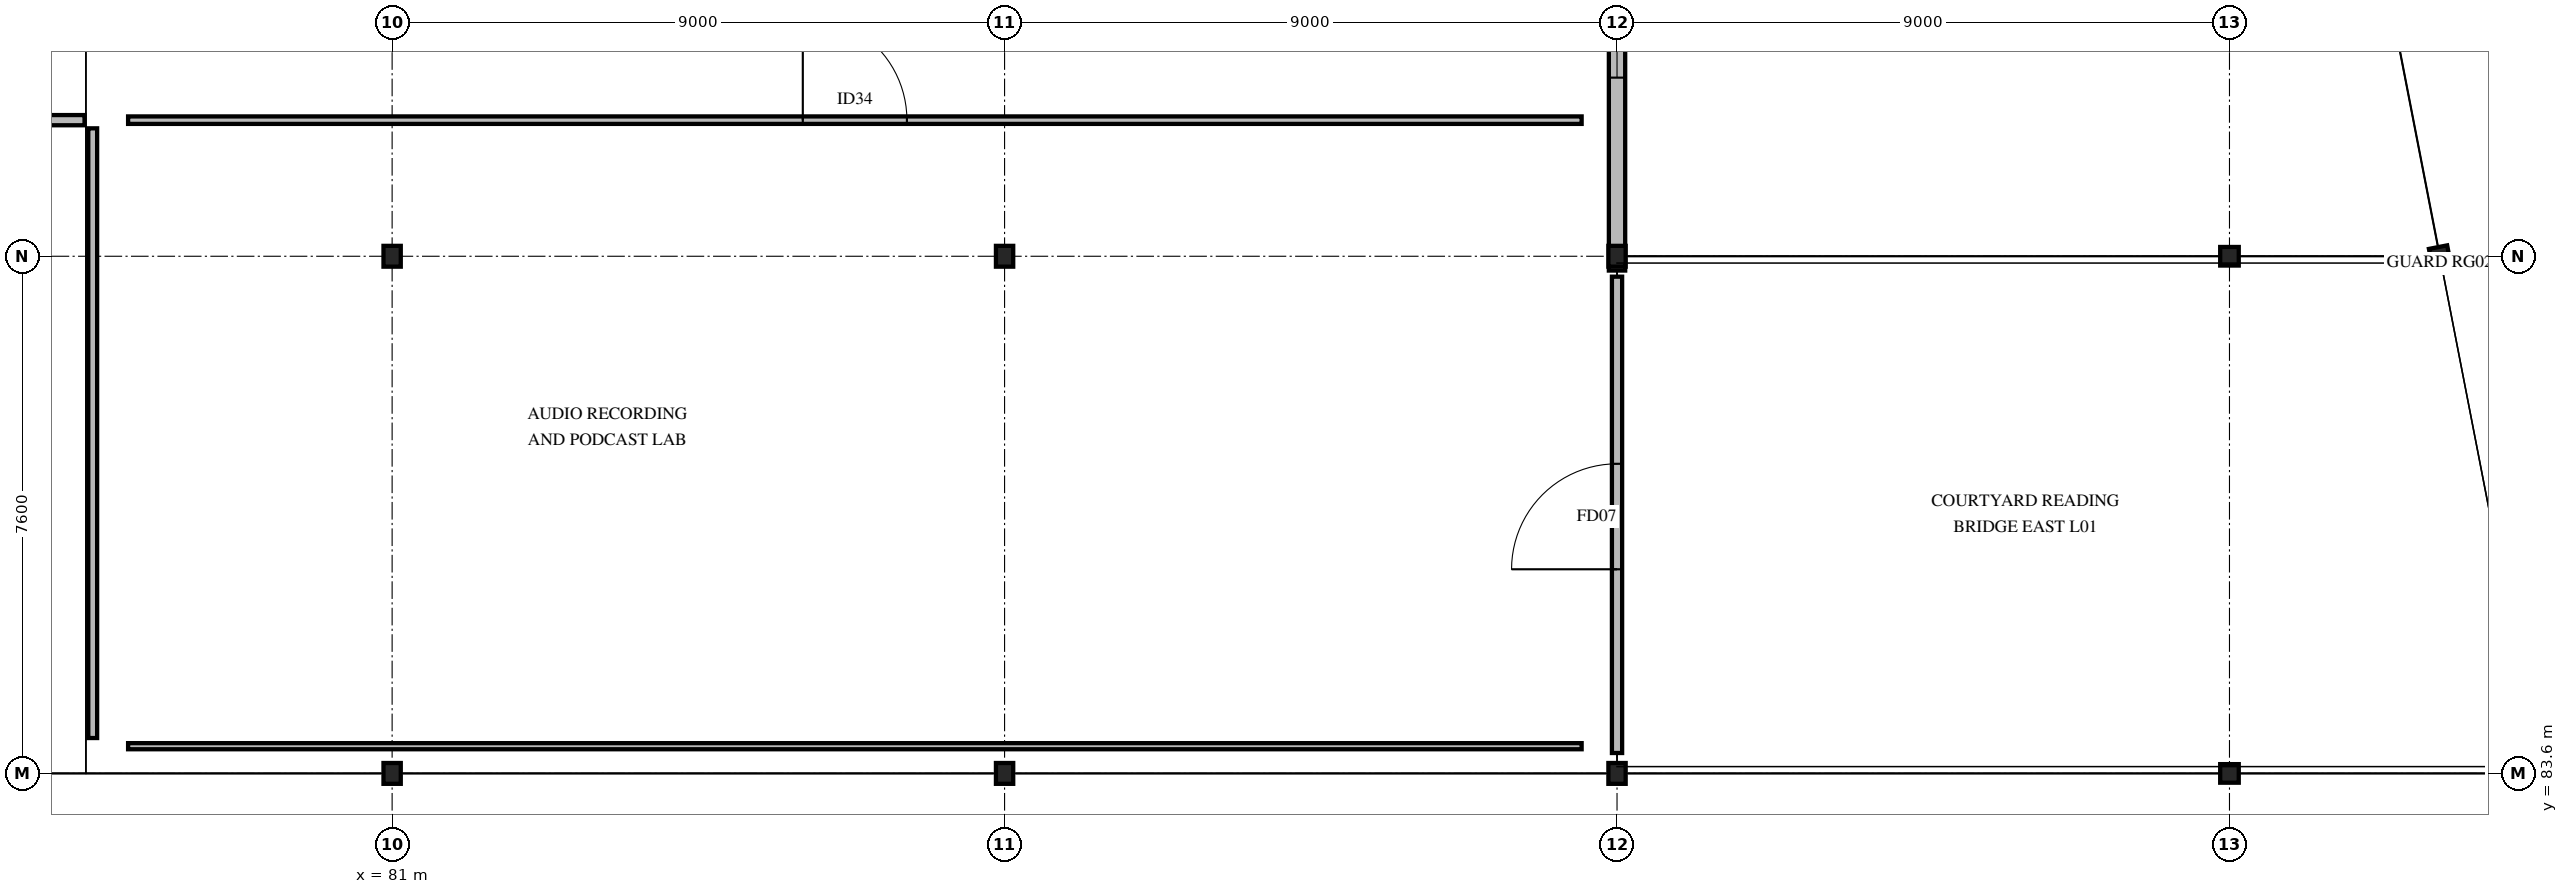
"""IFC4 building model, lengths in metres.
Left out: names, types, materials, properties, quantities, classifications, styles, units other than length and angle.
Written with IfcOpenShell. Run it as: python <this file> out.ifc"""

import sys

from ifc_helpers import new_model, si_unit, direction, frame, frame_2d, origin, origin_2d, place, context, subcontext, project, spatial, rectangle, hollow_circle, i_section, extrude, element, fill, save


model = new_model("IFC4")
c1 = context("Model", 3, precision=1e-05, world=origin(), true_north=direction((0.0, 1.0)))
c2 = subcontext(c1, "Body", "Model", "MODEL_VIEW")
j1 = project(units=[si_unit("LENGTHUNIT", "METRE"), si_unit("PLANEANGLEUNIT", "RADIAN")], contexts=[c1])
p1 = place(None, origin())
s1 = spatial("IfcSite", under=j1, at=p1, CompositionType="ELEMENT")
p2 = place(p1, origin())
s2 = spatial("IfcBuilding", under=s1, at=p2, CompositionType="ELEMENT")
p3 = place(p2, frame((0.0, 0.0, 5.04)))
s3 = spatial("IfcBuildingStorey", under=s2, at=p3, CompositionType="ELEMENT", Elevation=5.04)
for number, where, z_axis, x_axis in (
    (1, (81.0, 83.6, 0.0), (0.0, 0.0, 1.0), (1.0, 0.0, 0.0)),
    (2, (81.0, 91.2, 0.0), (0.0, 0.0, 1.0), (1.0, 0.0, 0.0)),
    (3, (90.0, 83.6, 0.0), (0.0, 0.0, 1.0), (1.0, 0.0, 0.0)),
    (4, (90.0, 91.2, 0.0), (0.0, 0.0, 1.0), (1.0, 0.0, 0.0)),
    (5, (99.0, 83.6, 0.0), (0.0, 0.0, 1.0), (1.0, 0.0, 0.0)),
    (6, (99.0, 91.2, 0.0), (0.0, 0.0, 1.0), (1.0, 0.0, 0.0)),
):
    element("IfcColumn", number, at=place(p3, frame(where, z_axis=z_axis, x_axis=x_axis)), inside=s3, PredefinedType="COLUMN", context=c2, shape_type="SweptSolid", body=[
        extrude(i_section(OverallWidth=0.254, OverallDepth=0.306, WebThickness=0.009, FlangeThickness=0.015, FilletRadius=0.015, at=origin_2d()), origin(), (0.0, 0.0, 1.0), 4.32),
    ])
for number, where, z_axis, x_axis in (
    (7, (108.0, 83.6, 0.0), (0.0, 0.0, 1.0), (1.0, 0.0, 0.0)),
    (8, (108.0, 91.2, 0.0), (0.0, 0.0, 1.0), (1.0, 0.0, 0.0)),
    (9, (111.091, 91.2, 0.0), (0.0, 0.0, 1.0), (0.982, 0.191, 0.0)),
):
    element("IfcColumn", number, at=place(p3, frame(where, z_axis=z_axis, x_axis=x_axis)), inside=s3, PredefinedType="COLUMN", context=c2, shape_type="SweptSolid", body=[
        extrude(hollow_circle(Radius=0.136, WallThickness=0.012, at=origin_2d()), origin(), (0.0, 0.0, 1.0), 4.32),
    ])
p4 = place(p3, frame((99.0, 90.99, 0.0), z_axis=(0.0, 0.0, 1.0), x_axis=(0.0, 1.0, 0.0)))
e10 = element("IfcWall", 10, at=p4, inside=s3, PredefinedType="STANDARD", context=c2, shape_type="SweptSolid", body=[
    extrude(rectangle(XDim=7.81, YDim=0.24, at=frame_2d((3.905, 0.0))), origin(), (0.0, 0.0, 1.0), 3.701),
])
p5 = place(p4, frame((2.835, 0.0, 0.85)))
e11 = element("IfcOpeningElement", 11, at=p5, cuts=e10, PredefinedType="OPENING", context=c2, shape_type="SweptSolid", body=[
    extrude(rectangle(XDim=2.35, YDim=1.5, at=frame_2d((1.175, 0.75))), frame((0.0, 0.13, 0.0), z_axis=(0.0, -1.0, 0.0), x_axis=(1.0, 0.0, 0.0)), (0.0, 0.0, 1.0), 0.26),
])
p6 = place(p3, frame((99.0, 83.9, 0.0), z_axis=(0.0, 0.0, 1.0), x_axis=(0.0, 1.0, 0.0)))
e12 = element("IfcWall", 12, at=p6, inside=s3, PredefinedType="PARTITIONING", context=c2, shape_type="SweptSolid", body=[
    extrude(rectangle(XDim=7.0, YDim=0.15, at=frame_2d((3.5, 0.0))), origin(), (0.0, 0.0, 1.0), 3.701),
])
p7 = place(p6, frame((2.7, 0.0, 0.0)))
e13 = element("IfcOpeningElement", 13, at=p7, cuts=e12, PredefinedType="OPENING", context=c2, shape_type="SweptSolid", body=[
    extrude(rectangle(XDim=1.55, YDim=2.2, at=frame_2d((0.775, 1.1))), frame((0.0, 0.085, 0.0), z_axis=(0.0, -1.0, 0.0), x_axis=(1.0, 0.0, 0.0)), (0.0, 0.0, 1.0), 0.17),
])
p8 = place(p3, frame((54.52, 93.2, 0.0), z_axis=(0.0, 0.0, 1.0), x_axis=(1.0, 0.0, 0.0)))
e14 = element("IfcWall", 14, at=p8, inside=s3, PredefinedType="PARTITIONING", context=c2, shape_type="SweptSolid", body=[
    extrude(rectangle(XDim=21.96, YDim=0.15, at=frame_2d((10.98, 0.0))), origin(), (0.0, 0.0, 1.0), 4.04),
])
p9 = place(p8, frame((9.99, 0.0, 0.0)))
e15 = element("IfcOpeningElement", 15, at=p9, cuts=e14, PredefinedType="OPENING", context=c2, shape_type="SweptSolid", body=[
    extrude(rectangle(XDim=1.0, YDim=2.15, at=frame_2d((0.5, 1.075))), frame((0.0, 0.085, 0.0), z_axis=(0.0, -1.0, 0.0), x_axis=(1.0, 0.0, 0.0)), (0.0, 0.0, 1.0), 0.17),
])
p10 = place(p3, frame((76.6, 84.12, 0.0), z_axis=(0.0, 0.0, 1.0), x_axis=(0.0, 1.0, 0.0)))
e16 = element("IfcWall", 16, at=p10, inside=s3, PredefinedType="PARTITIONING", context=c2, shape_type="SweptSolid", body=[
    extrude(rectangle(XDim=8.96, YDim=0.13, at=frame_2d((4.48, 0.0))), origin(), (0.0, 0.0, 1.0), 4.04),
])
p11 = place(p3, frame((77.12, 93.2, 0.0), z_axis=(0.0, 0.0, 1.0), x_axis=(1.0, 0.0, 0.0)))
e17 = element("IfcWall", 17, at=p11, inside=s3, PredefinedType="PARTITIONING", context=c2, shape_type="SweptSolid", body=[
    extrude(rectangle(XDim=21.36, YDim=0.11, at=frame_2d((10.68, 0.0))), origin(), (0.0, 0.0, 1.0), 4.04),
])
p12 = place(p11, frame((9.915, 0.0, 0.0)))
e18 = element("IfcOpeningElement", 18, at=p12, cuts=e17, PredefinedType="OPENING", context=c2, shape_type="SweptSolid", body=[
    extrude(rectangle(XDim=1.53, YDim=2.15, at=frame_2d((0.765, 1.075))), frame((0.0, 0.065, 0.0), z_axis=(0.0, -1.0, 0.0), x_axis=(1.0, 0.0, 0.0)), (0.0, 0.0, 1.0), 0.13),
])
p13 = place(p3, frame((77.12, 84.0, 0.0), z_axis=(0.0, 0.0, 1.0), x_axis=(1.0, 0.0, 0.0)))
e19 = element("IfcWall", 19, at=p13, inside=s3, PredefinedType="PARTITIONING", context=c2, shape_type="SweptSolid", body=[
    extrude(rectangle(XDim=21.36, YDim=0.09, at=frame_2d((10.68, 0.0))), origin(), (0.0, 0.0, 1.0), 4.04),
])
p14 = place(p5, origin())
e20 = element("IfcWindow", 20, at=p14, inside=s3, PartitioningType="SINGLE_PANEL", PredefinedType="WINDOW", context=c2, shape_type="SweptSolid", body=[
    extrude(rectangle(XDim=2.35, YDim=1.5, at=frame_2d((1.175, 0.75))), frame((0.0, 0.03, 0.0), z_axis=(0.0, -1.0, 0.0), x_axis=(1.0, 0.0, 0.0)), (0.0, 0.0, 1.0), 0.06),
])
fill(e11, e20)
p15 = place(p7, origin())
e21 = element("IfcDoor", 21, at=p15, inside=s3, OperationType="SINGLE_SWING_LEFT", PredefinedType="DOOR", context=c2, shape_type="SweptSolid", body=[
    extrude(rectangle(XDim=1.55, YDim=2.2, at=frame_2d((0.775, 1.1))), frame((0.0, 0.025, 0.0), z_axis=(0.0, -1.0, 0.0), x_axis=(1.0, 0.0, 0.0)), (0.0, 0.0, 1.0), 0.05),
])
fill(e13, e21)
p16 = place(p12, origin())
e22 = element("IfcDoor", 22, at=p16, inside=s3, OperationType="SINGLE_SWING_LEFT", PredefinedType="DOOR", context=c2, shape_type="SweptSolid", body=[
    extrude(rectangle(XDim=1.53, YDim=2.15, at=frame_2d((0.765, 1.075))), frame((0.0, 0.025, 0.0), z_axis=(0.0, -1.0, 0.0), x_axis=(1.0, 0.0, 0.0)), (0.0, 0.0, 1.0), 0.05),
])
fill(e18, e22)
save(model, sys.argv[1])
